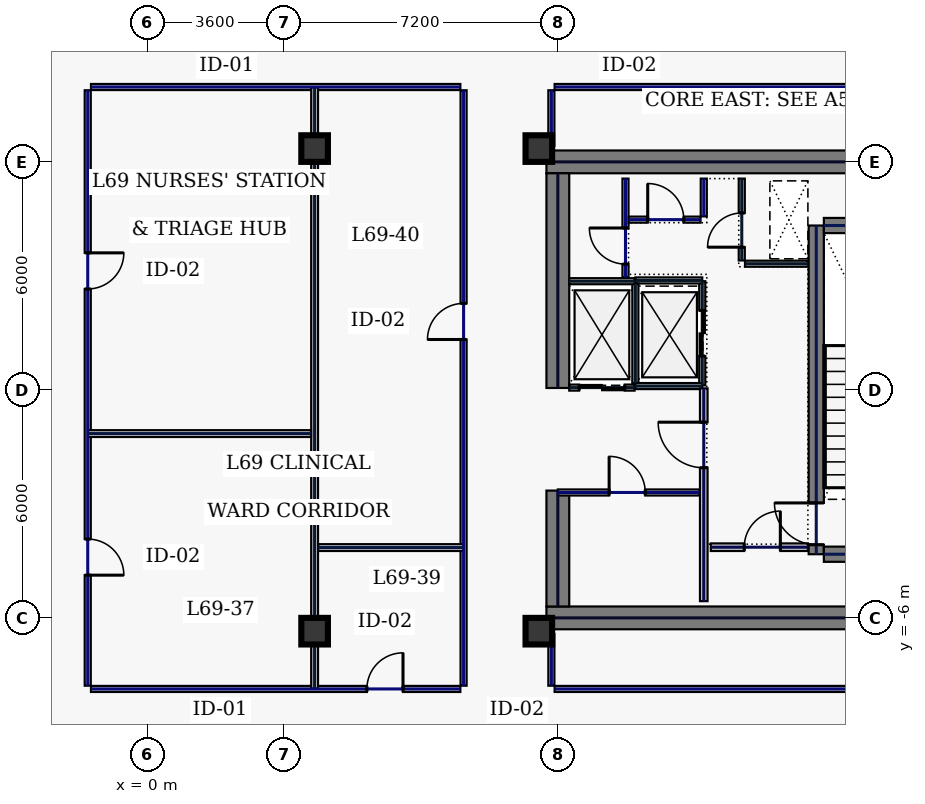
"""IFC4 building model, lengths in metres.
Left out: names, types, materials, properties, quantities, classifications, styles, units other than length and angle.
Written with IfcOpenShell. Run it as: python <this file> out.ifc"""

import sys

from ifc_helpers import new_model, si_unit, direction, frame, frame_2d, origin, origin_2d, place, context, subcontext, project, spatial, rectangle, hollow_rectangle, extrude, element, fill, save


model = new_model("IFC4")
c1 = context("Model", 3, precision=1e-05, world=origin(), true_north=direction((0.0, 1.0)))
c2 = subcontext(c1, "Body", "Model", "MODEL_VIEW")
j1 = project(units=[si_unit("LENGTHUNIT", "METRE"), si_unit("PLANEANGLEUNIT", "RADIAN")], contexts=[c1])
p1 = place(None, origin())
s1 = spatial("IfcSite", under=j1, at=p1, CompositionType="ELEMENT")
p2 = place(p1, origin())
s2 = spatial("IfcBuilding", under=s1, at=p2, CompositionType="ELEMENT")
p3 = place(p2, frame((0.0, 0.0, 297.0)))
s3 = spatial("IfcBuildingStorey", under=s2, at=p3, CompositionType="ELEMENT", Elevation=297.0)
for number, where, z_axis, x_axis in (
    (1, (10.5, 6.0, 0.0), (0.0, 0.0, 1.0), (1.0, 0.0, 0.0)),
    (2, (10.5, -6.0, 0.0), (0.0, 0.0, 1.0), (1.0, 0.0, 0.0)),
):
    element("IfcWall", number, at=place(p3, frame(where, z_axis=z_axis, x_axis=x_axis)), inside=s3, PredefinedType="SHEAR", context=c2, shape_type="SweptSolid", body=[
        extrude(rectangle(XDim=11.5, YDim=0.6, at=frame_2d((5.75, 0.0))), origin(), (0.0, 0.0, 1.0), 3.74),
    ])
p4 = place(p3, frame((10.8, -5.7, 0.0), z_axis=(0.0, 0.0, 1.0), x_axis=(0.0, 1.0, 0.0)))
e3 = element("IfcWall", 3, at=p4, inside=s3, PredefinedType="SHEAR", context=c2, shape_type="SweptSolid", body=[
    extrude(rectangle(XDim=3.05, YDim=0.6, at=frame_2d((1.525, 0.0))), origin(), (0.0, 0.0, 1.0), 3.74),
])
p5 = place(p3, frame((10.8, 0.05, 0.0), z_axis=(0.0, 0.0, 1.0), x_axis=(0.0, 1.0, 0.0)))
e4 = element("IfcWall", 4, at=p5, inside=s3, PredefinedType="SHEAR", context=c2, shape_type="SweptSolid", body=[
    extrude(rectangle(XDim=5.65, YDim=0.6, at=frame_2d((2.825, 0.0))), origin(), (0.0, 0.0, 1.0), 3.74),
])
p6 = place(p3, frame((17.6, -4.325, 0.0), z_axis=(0.0, 0.0, 1.0), x_axis=(0.0, 1.0, 0.0)))
e5 = element("IfcWall", 5, at=p6, inside=s3, PredefinedType="SHEAR", context=c2, shape_type="SweptSolid", body=[
    extrude(rectangle(XDim=8.65, YDim=0.4, at=frame_2d((4.325, 0.0))), origin(), (0.0, 0.0, 1.0), 3.74),
])
p7 = place(p6, frame((0.25, 0.0, 0.0)))
e6 = element("IfcOpeningElement", 6, at=p7, cuts=e5, PredefinedType="OPENING", context=c2, shape_type="SweptSolid", body=[
    extrude(rectangle(XDim=1.1, YDim=2.2, at=frame_2d((0.55, 1.1))), frame((0.0, 0.21, 0.0), z_axis=(0.0, -1.0, 0.0), x_axis=(1.0, 0.0, 0.0)), (0.0, 0.0, 1.0), 0.42),
])
for number, where, z_axis, x_axis in (
    (7, (17.8, -4.325, 0.0), (0.0, 0.0, 1.0), (1.0, 0.0, 0.0)),
    (8, (17.8, 4.325, 0.0), (0.0, 0.0, 1.0), (1.0, 0.0, 0.0)),
):
    element("IfcWall", number, at=place(p3, frame(where, z_axis=z_axis, x_axis=x_axis)), inside=s3, PredefinedType="SHEAR", context=c2, shape_type="SweptSolid", body=[
        extrude(rectangle(XDim=3.4, YDim=0.4, at=frame_2d((1.7, 0.0))), origin(), (0.0, 0.0, 1.0), 3.74),
    ])
for number, where, z_axis, x_axis in (
    (9, (10.3, -6.35, 0.0), (0.0, 0.0, 1.0), (1.0, 0.0, 0.0)),
    (10, (10.3, 6.35, 0.0), (0.0, 0.0, 1.0), (1.0, 0.0, 0.0)),
    (11, (4.4, -6.35, 0.0), (0.0, 0.0, 1.0), (1.0, 0.0, 0.0)),
    (12, (4.4, 6.35, 0.0), (0.0, 0.0, 1.0), (1.0, 0.0, 0.0)),
):
    element("IfcColumn", number, at=place(p3, frame(where, z_axis=z_axis, x_axis=x_axis)), inside=s3, PredefinedType="COLUMN", context=c2, shape_type="SweptSolid", body=[
        extrude(hollow_rectangle(XDim=0.7, YDim=0.7, WallThickness=0.032, at=origin_2d()), origin(), (0.0, 0.0, 1.0), 3.74),
    ])
p8 = place(p3, frame((14.6, 0.12, 0.0), z_axis=(0.0, 0.0, 1.0), x_axis=(0.0, 1.0, 0.0)))
e13 = element("IfcWall", 13, at=p8, inside=s3, PredefinedType="PARTITIONING", context=c2, shape_type="SweptSolid", body=[
    extrude(rectangle(XDim=2.74, YDim=0.16, at=frame_2d((1.37, 0.0))), origin(), (0.0, 0.0, 1.0), 3.74),
])
p9 = place(p8, frame((0.77, 0.0, 0.0)))
e14 = element("IfcOpeningElement", 14, at=p9, cuts=e13, PredefinedType="OPENING", context=c2, shape_type="SweptSolid", body=[
    extrude(rectangle(XDim=1.2, YDim=2.2, at=frame_2d((0.6, 1.1))), frame((0.0, 0.09, 0.0), z_axis=(0.0, -1.0, 0.0), x_axis=(1.0, 0.0, 0.0)), (0.0, 0.0, 1.0), 0.18),
])
for number, where, z_axis, x_axis in (
    (15, (12.84, 0.1, 0.0), (0.0, 0.0, 1.0), (1.0, 0.0, 0.0)),
    (16, (12.84, 2.88, 0.0), (0.0, 0.0, 1.0), (1.0, 0.0, 0.0)),
):
    element("IfcWall", number, at=place(p3, frame(where, z_axis=z_axis, x_axis=x_axis)), inside=s3, PredefinedType="PARTITIONING", context=c2, shape_type="SweptSolid", body=[
        extrude(rectangle(XDim=1.76, YDim=0.16, at=frame_2d((0.88, 0.0))), origin(), (0.0, 0.0, 1.0), 3.74),
    ])
p10 = place(p3, frame((12.84, 0.18, 0.0), z_axis=(0.0, 0.0, 1.0), x_axis=(0.0, 1.0, 0.0)))
e17 = element("IfcWall", 17, at=p10, inside=s3, PredefinedType="PARTITIONING", context=c2, shape_type="SweptSolid", body=[
    extrude(rectangle(XDim=2.62, YDim=0.16, at=frame_2d((1.31, 0.0))), origin(), (0.0, 0.0, 1.0), 3.74),
])
p11 = place(p3, frame((11.1, 0.06, 0.0), z_axis=(0.0, 0.0, 1.0), x_axis=(1.0, 0.0, 0.0)))
e18 = element("IfcWall", 18, at=p11, inside=s3, PredefinedType="PARTITIONING", context=c2, shape_type="SweptSolid", body=[
    extrude(rectangle(XDim=1.72, YDim=0.16, at=frame_2d((0.86, 0.0))), origin(), (0.0, 0.0, 1.0), 3.74),
])
p12 = place(p11, frame((0.26, 0.0, 0.0)))
e19 = element("IfcOpeningElement", 19, at=p12, cuts=e18, PredefinedType="OPENING", context=c2, shape_type="SweptSolid", body=[
    extrude(rectangle(XDim=1.2, YDim=2.2, at=frame_2d((0.6, 1.1))), frame((0.0, 0.09, 0.0), z_axis=(0.0, -1.0, 0.0), x_axis=(1.0, 0.0, 0.0)), (0.0, 0.0, 1.0), 0.18),
])
p13 = place(p3, frame((11.1, 2.86, 0.0), z_axis=(0.0, 0.0, 1.0), x_axis=(1.0, 0.0, 0.0)))
e20 = element("IfcWall", 20, at=p13, inside=s3, PredefinedType="PARTITIONING", context=c2, shape_type="SweptSolid", body=[
    extrude(rectangle(XDim=1.72, YDim=0.16, at=frame_2d((0.86, 0.0))), origin(), (0.0, 0.0, 1.0), 3.74),
])
p14 = place(p3, frame((15.64, 3.405, 0.0), z_axis=(0.0, 0.0, 1.0), x_axis=(0.0, 1.0, 0.0)))
e21 = element("IfcWall", 21, at=p14, inside=s3, PredefinedType="PARTITIONING", context=c2, shape_type="SweptSolid", body=[
    extrude(rectangle(XDim=2.155, YDim=0.16, at=frame_2d((1.078, 0.0))), origin(), (0.0, 0.0, 1.0), 3.74),
])
p15 = place(p14, frame((0.35, 0.0, 0.0)))
e22 = element("IfcOpeningElement", 22, at=p15, cuts=e21, PredefinedType="OPENING", context=c2, shape_type="SweptSolid", body=[
    extrude(rectangle(XDim=0.9, YDim=2.2, at=frame_2d((0.45, 1.1))), frame((0.0, 0.09, 0.0), z_axis=(0.0, -1.0, 0.0), x_axis=(1.0, 0.0, 0.0)), (0.0, 0.0, 1.0), 0.18),
])
p16 = place(p3, frame((15.725, 3.32, 0.0), z_axis=(0.0, 0.0, 1.0), x_axis=(1.0, 0.0, 0.0)))
e23 = element("IfcWall", 23, at=p16, inside=s3, PredefinedType="PARTITIONING", context=c2, shape_type="SweptSolid", body=[
    extrude(rectangle(XDim=1.655, YDim=0.16, at=frame_2d((0.827, 0.0))), origin(), (0.0, 0.0, 1.0), 3.74),
])
p17 = place(p3, frame((14.825, -4.14, 0.0), z_axis=(0.0, 0.0, 1.0), x_axis=(1.0, 0.0, 0.0)))
e24 = element("IfcWall", 24, at=p17, inside=s3, PredefinedType="SOLIDWALL", context=c2, shape_type="SweptSolid", body=[
    extrude(rectangle(XDim=2.555, YDim=0.2, at=frame_2d((1.277, 0.0))), origin(), (0.0, 0.0, 1.0), 3.74),
])
p18 = place(p17, frame((0.88, 0.0, 0.0)))
e25 = element("IfcOpeningElement", 25, at=p18, cuts=e24, PredefinedType="OPENING", context=c2, shape_type="SweptSolid", body=[
    extrude(rectangle(XDim=0.95, YDim=2.2, at=frame_2d((0.475, 1.1))), frame((0.0, 0.11, 0.0), z_axis=(0.0, -1.0, 0.0), x_axis=(1.0, 0.0, 0.0)), (0.0, 0.0, 1.0), 0.22),
])
p19 = place(p3, frame((10.8, -2.7, 0.0), z_axis=(0.0, 0.0, 1.0), x_axis=(1.0, 0.0, 0.0)))
e26 = element("IfcWall", 26, at=p19, inside=s3, PredefinedType="PARTITIONING", context=c2, shape_type="SweptSolid", body=[
    extrude(rectangle(XDim=3.735, YDim=0.16, at=frame_2d((1.867, 0.0))), origin(), (0.0, 0.0, 1.0), 3.74),
])
p20 = place(p19, frame((1.35, 0.0, 0.0)))
e27 = element("IfcOpeningElement", 27, at=p20, cuts=e26, PredefinedType="OPENING", context=c2, shape_type="SweptSolid", body=[
    extrude(rectangle(XDim=0.95, YDim=2.2, at=frame_2d((0.475, 1.1))), frame((0.0, 0.09, 0.0), z_axis=(0.0, -1.0, 0.0), x_axis=(1.0, 0.0, 0.0)), (0.0, 0.0, 1.0), 0.18),
])
p21 = place(p3, frame((12.58, 2.96, 0.0), z_axis=(0.0, 0.0, 1.0), x_axis=(0.0, 1.0, 0.0)))
e28 = element("IfcWall", 28, at=p21, inside=s3, PredefinedType="PARTITIONING", context=c2, shape_type="SweptSolid", body=[
    extrude(rectangle(XDim=2.6, YDim=0.16, at=frame_2d((1.3, 0.0))), origin(), (0.0, 0.0, 1.0), 3.74),
])
p22 = place(p21, frame((0.35, 0.0, 0.0)))
e29 = element("IfcOpeningElement", 29, at=p22, cuts=e28, PredefinedType="OPENING", context=c2, shape_type="SweptSolid", body=[
    extrude(rectangle(XDim=0.95, YDim=2.2, at=frame_2d((0.475, 1.1))), frame((0.0, 0.09, 0.0), z_axis=(0.0, -1.0, 0.0), x_axis=(1.0, 0.0, 0.0)), (0.0, 0.0, 1.0), 0.18),
])
p23 = place(p3, frame((12.665, 4.48, 0.0), z_axis=(0.0, 0.0, 1.0), x_axis=(1.0, 0.0, 0.0)))
e30 = element("IfcWall", 30, at=p23, inside=s3, PredefinedType="PARTITIONING", context=c2, shape_type="SweptSolid", body=[
    extrude(rectangle(XDim=1.89, YDim=0.16, at=frame_2d((0.945, 0.0))), origin(), (0.0, 0.0, 1.0), 3.74),
])
p24 = place(p23, frame((0.5, 0.0, 0.0)))
e31 = element("IfcOpeningElement", 31, at=p24, cuts=e30, PredefinedType="OPENING", context=c2, shape_type="SweptSolid", body=[
    extrude(rectangle(XDim=0.95, YDim=2.2, at=frame_2d((0.475, 1.1))), frame((0.0, 0.09, 0.0), z_axis=(0.0, -1.0, 0.0), x_axis=(1.0, 0.0, 0.0)), (0.0, 0.0, 1.0), 0.18),
])
p25 = place(p3, frame((14.64, 4.565, 0.0), z_axis=(0.0, 0.0, 1.0), x_axis=(0.0, 1.0, 0.0)))
e32 = element("IfcWall", 32, at=p25, inside=s3, PredefinedType="PARTITIONING", context=c2, shape_type="SweptSolid", body=[
    extrude(rectangle(XDim=0.995, YDim=0.16, at=frame_2d((0.498, 0.0))), origin(), (0.0, 0.0, 1.0), 3.74),
])
p26 = place(p3, frame((14.64, -5.56, 0.0), z_axis=(0.0, 0.0, 1.0), x_axis=(0.0, 1.0, 0.0)))
e33 = element("IfcWall", 33, at=p26, inside=s3, PredefinedType="SOLIDWALL", context=c2, shape_type="SweptSolid", body=[
    extrude(rectangle(XDim=5.6, YDim=0.2, at=frame_2d((2.8, 0.0))), origin(), (0.0, 0.0, 1.0), 3.74),
])
p27 = place(p26, frame((3.51, 0.0, 0.0)))
e34 = element("IfcOpeningElement", 34, at=p27, cuts=e33, PredefinedType="OPENING", context=c2, shape_type="SweptSolid", body=[
    extrude(rectangle(XDim=1.2, YDim=2.2, at=frame_2d((0.6, 1.1))), frame((0.0, 0.11, 0.0), z_axis=(0.0, -1.0, 0.0), x_axis=(1.0, 0.0, 0.0)), (0.0, 0.0, 1.0), 0.22),
])
p28 = place(p3, frame((21.915, 7.97, 0.0), z_axis=(0.0, 0.0, 1.0), x_axis=(-1.0, 0.0, 0.0)))
e35 = element("IfcWall", 35, at=p28, inside=s3, PredefinedType="PARTITIONING", context=c2, shape_type="SweptSolid", body=[
    extrude(rectangle(XDim=11.2, YDim=0.16, at=frame_2d((5.6, 0.0))), origin(), (0.0, 0.0, 1.0), 3.74),
])
p29 = place(p3, frame((10.63, 7.885, 0.0), z_axis=(0.0, 0.0, 1.0), x_axis=(0.0, -1.0, 0.0)))
e36 = element("IfcWall", 36, at=p29, inside=s3, PredefinedType="PARTITIONING", context=c2, shape_type="SweptSolid", body=[
    extrude(rectangle(XDim=1.465, YDim=0.16, at=frame_2d((0.732, 0.0))), origin(), (0.0, 0.0, 1.0), 3.74),
])
p30 = place(p3, frame((10.63, -6.42, 0.0), z_axis=(0.0, 0.0, 1.0), x_axis=(0.0, -1.0, 0.0)))
e37 = element("IfcWall", 37, at=p30, inside=s3, PredefinedType="PARTITIONING", context=c2, shape_type="SweptSolid", body=[
    extrude(rectangle(XDim=1.365, YDim=0.16, at=frame_2d((0.683, 0.0))), origin(), (0.0, 0.0, 1.0), 3.74),
])
p31 = place(p3, frame((10.715, -7.87, 0.0), z_axis=(0.0, 0.0, 1.0), x_axis=(1.0, 0.0, 0.0)))
e38 = element("IfcWall", 38, at=p31, inside=s3, PredefinedType="PARTITIONING", context=c2, shape_type="SweptSolid", body=[
    extrude(rectangle(XDim=11.2, YDim=0.16, at=frame_2d((5.6, 0.0))), origin(), (0.0, 0.0, 1.0), 3.74),
])
p32 = place(p3, frame((8.235, 7.97, 0.0), z_axis=(0.0, 0.0, 1.0), x_axis=(-1.0, 0.0, 0.0)))
e39 = element("IfcWall", 39, at=p32, inside=s3, PredefinedType="PARTITIONING", context=c2, shape_type="SweptSolid", body=[
    extrude(rectangle(XDim=9.72, YDim=0.16, at=frame_2d((4.86, 0.0))), origin(), (0.0, 0.0, 1.0), 3.74),
])
p33 = place(p3, frame((-1.57, 7.885, 0.0), z_axis=(0.0, 0.0, 1.0), x_axis=(0.0, -1.0, 0.0)))
e40 = element("IfcWall", 40, at=p33, inside=s3, PredefinedType="PARTITIONING", context=c2, shape_type="SweptSolid", body=[
    extrude(rectangle(XDim=15.67, YDim=0.16, at=frame_2d((7.835, 0.0))), origin(), (0.0, 0.0, 1.0), 3.74),
])
p34 = place(p33, frame((11.811, 0.0, 0.0)))
e41 = element("IfcOpeningElement", 41, at=p34, cuts=e40, PredefinedType="OPENING", context=c2, shape_type="SweptSolid", body=[
    extrude(rectangle(XDim=0.95, YDim=2.2, at=frame_2d((0.475, 1.1))), frame((0.0, 0.09, 0.0), z_axis=(0.0, -1.0, 0.0), x_axis=(1.0, 0.0, 0.0)), (0.0, 0.0, 1.0), 0.18),
])
p35 = place(p33, frame((4.279, 0.0, 0.0)))
e42 = element("IfcOpeningElement", 42, at=p35, cuts=e40, PredefinedType="OPENING", context=c2, shape_type="SweptSolid", body=[
    extrude(rectangle(XDim=0.95, YDim=2.2, at=frame_2d((0.475, 1.1))), frame((0.0, 0.09, 0.0), z_axis=(0.0, -1.0, 0.0), x_axis=(1.0, 0.0, 0.0)), (0.0, 0.0, 1.0), 0.18),
])
p36 = place(p3, frame((-1.485, -7.87, 0.0), z_axis=(0.0, 0.0, 1.0), x_axis=(1.0, 0.0, 0.0)))
e43 = element("IfcWall", 43, at=p36, inside=s3, PredefinedType="PARTITIONING", context=c2, shape_type="SweptSolid", body=[
    extrude(rectangle(XDim=9.72, YDim=0.16, at=frame_2d((4.86, 0.0))), origin(), (0.0, 0.0, 1.0), 3.74),
])
p37 = place(p36, frame((7.261, 0.0, 0.0)))
e44 = element("IfcOpeningElement", 44, at=p37, cuts=e43, PredefinedType="OPENING", context=c2, shape_type="SweptSolid", body=[
    extrude(rectangle(XDim=0.95, YDim=2.2, at=frame_2d((0.475, 1.1))), frame((0.0, 0.09, 0.0), z_axis=(0.0, -1.0, 0.0), x_axis=(1.0, 0.0, 0.0)), (0.0, 0.0, 1.0), 0.18),
])
p38 = place(p3, frame((8.32, -7.785, 0.0), z_axis=(0.0, 0.0, 1.0), x_axis=(0.0, 1.0, 0.0)))
e45 = element("IfcWall", 45, at=p38, inside=s3, PredefinedType="PARTITIONING", context=c2, shape_type="SweptSolid", body=[
    extrude(rectangle(XDim=15.67, YDim=0.16, at=frame_2d((7.835, 0.0))), origin(), (0.0, 0.0, 1.0), 3.74),
])
p39 = place(p38, frame((9.111, 0.0, 0.0)))
e46 = element("IfcOpeningElement", 46, at=p39, cuts=e45, PredefinedType="OPENING", context=c2, shape_type="SweptSolid", body=[
    extrude(rectangle(XDim=0.95, YDim=2.2, at=frame_2d((0.475, 1.1))), frame((0.0, 0.09, 0.0), z_axis=(0.0, -1.0, 0.0), x_axis=(1.0, 0.0, 0.0)), (0.0, 0.0, 1.0), 0.18),
])
p40 = place(p3, frame((4.4, -7.865, 0.0), z_axis=(0.0, 0.0, 1.0), x_axis=(0.0, 1.0, 0.0)))
e47 = element("IfcWall", 47, at=p40, inside=s3, PredefinedType="PARTITIONING", context=c2, shape_type="SweptSolid", body=[
    extrude(rectangle(XDim=15.83, YDim=0.18, at=frame_2d((7.915, 0.0))), origin(), (0.0, 0.0, 1.0), 3.035),
])
p41 = place(p3, frame((-1.565, -1.15, 0.0), z_axis=(0.0, 0.0, 1.0), x_axis=(1.0, 0.0, 0.0)))
e48 = element("IfcWall", 48, at=p41, inside=s3, PredefinedType="PARTITIONING", context=c2, shape_type="SweptSolid", body=[
    extrude(rectangle(XDim=5.87, YDim=0.18, at=frame_2d((2.935, 0.0))), origin(), (0.0, 0.0, 1.0), 3.74),
])
p42 = place(p3, frame((4.495, -4.15, 0.0), z_axis=(0.0, 0.0, 1.0), x_axis=(1.0, 0.0, 0.0)))
e49 = element("IfcWall", 49, at=p42, inside=s3, PredefinedType="PARTITIONING", context=c2, shape_type="SweptSolid", body=[
    extrude(rectangle(XDim=3.82, YDim=0.18, at=frame_2d((1.91, 0.0))), origin(), (0.0, 0.0, 1.0), 3.74),
])
p43 = place(p7, origin())
e50 = element("IfcDoor", 50, at=p43, inside=s3, OperationType="SINGLE_SWING_RIGHT", PredefinedType="DOOR", context=c2, shape_type="SweptSolid", body=[
    extrude(rectangle(XDim=1.1, YDim=2.2, at=frame_2d((0.55, 1.1))), frame((0.0, 0.025, 0.0), z_axis=(0.0, -1.0, 0.0), x_axis=(1.0, 0.0, 0.0)), (0.0, 0.0, 1.0), 0.05),
])
fill(e6, e50)
p44 = place(p9, origin())
e51 = element("IfcDoor", 51, at=p44, inside=s3, OperationType="SLIDING_TO_LEFT", PredefinedType="DOOR", context=c2, shape_type="SweptSolid", body=[
    extrude(rectangle(XDim=1.2, YDim=2.2, at=frame_2d((0.6, 1.1))), frame((0.0, 0.025, 0.0), z_axis=(0.0, -1.0, 0.0), x_axis=(1.0, 0.0, 0.0)), (0.0, 0.0, 1.0), 0.05),
])
fill(e14, e51)
p45 = place(p12, origin())
e52 = element("IfcDoor", 52, at=p45, inside=s3, OperationType="SLIDING_TO_LEFT", PredefinedType="DOOR", context=c2, shape_type="SweptSolid", body=[
    extrude(rectangle(XDim=1.2, YDim=2.2, at=frame_2d((0.6, 1.1))), frame((0.0, 0.025, 0.0), z_axis=(0.0, -1.0, 0.0), x_axis=(1.0, 0.0, 0.0)), (0.0, 0.0, 1.0), 0.05),
])
fill(e19, e52)
p46 = place(p15, origin())
e53 = element("IfcDoor", 53, at=p46, inside=s3, OperationType="SINGLE_SWING_LEFT", PredefinedType="DOOR", context=c2, shape_type="SweptSolid", body=[
    extrude(rectangle(XDim=0.9, YDim=2.2, at=frame_2d((0.45, 1.1))), frame((0.0, 0.025, 0.0), z_axis=(0.0, -1.0, 0.0), x_axis=(1.0, 0.0, 0.0)), (0.0, 0.0, 1.0), 0.05),
])
fill(e22, e53)
p47 = place(p18, origin())
e54 = element("IfcDoor", 54, at=p47, inside=s3, OperationType="SINGLE_SWING_RIGHT", PredefinedType="DOOR", context=c2, shape_type="SweptSolid", body=[
    extrude(rectangle(XDim=0.95, YDim=2.2, at=frame_2d((0.475, 1.1))), frame((0.0, 0.025, 0.0), z_axis=(0.0, -1.0, 0.0), x_axis=(1.0, 0.0, 0.0)), (0.0, 0.0, 1.0), 0.05),
])
fill(e25, e54)
p48 = place(p20, origin())
e55 = element("IfcDoor", 55, at=p48, inside=s3, OperationType="SINGLE_SWING_LEFT", PredefinedType="DOOR", context=c2, shape_type="SweptSolid", body=[
    extrude(rectangle(XDim=0.95, YDim=2.2, at=frame_2d((0.475, 1.1))), frame((0.0, 0.025, 0.0), z_axis=(0.0, -1.0, 0.0), x_axis=(1.0, 0.0, 0.0)), (0.0, 0.0, 1.0), 0.05),
])
fill(e27, e55)
p49 = place(p22, origin())
e56 = element("IfcDoor", 56, at=p49, inside=s3, OperationType="SINGLE_SWING_RIGHT", PredefinedType="DOOR", context=c2, shape_type="SweptSolid", body=[
    extrude(rectangle(XDim=0.95, YDim=2.2, at=frame_2d((0.475, 1.1))), frame((0.0, 0.025, 0.0), z_axis=(0.0, -1.0, 0.0), x_axis=(1.0, 0.0, 0.0)), (0.0, 0.0, 1.0), 0.05),
])
fill(e29, e56)
p50 = place(p24, origin())
e57 = element("IfcDoor", 57, at=p50, inside=s3, OperationType="SINGLE_SWING_LEFT", PredefinedType="DOOR", context=c2, shape_type="SweptSolid", body=[
    extrude(rectangle(XDim=0.95, YDim=2.2, at=frame_2d((0.475, 1.1))), frame((0.0, 0.025, 0.0), z_axis=(0.0, -1.0, 0.0), x_axis=(1.0, 0.0, 0.0)), (0.0, 0.0, 1.0), 0.05),
])
fill(e31, e57)
p51 = place(p27, origin())
e58 = element("IfcDoor", 58, at=p51, inside=s3, OperationType="SINGLE_SWING_RIGHT", PredefinedType="DOOR", context=c2, shape_type="SweptSolid", body=[
    extrude(rectangle(XDim=1.2, YDim=2.2, at=frame_2d((0.6, 1.1))), frame((0.0, 0.025, 0.0), z_axis=(0.0, -1.0, 0.0), x_axis=(1.0, 0.0, 0.0)), (0.0, 0.0, 1.0), 0.05),
])
fill(e34, e58)
p52 = place(p34, origin())
e59 = element("IfcDoor", 59, at=p52, inside=s3, OperationType="SINGLE_SWING_RIGHT", PredefinedType="DOOR", context=c2, shape_type="SweptSolid", body=[
    extrude(rectangle(XDim=0.95, YDim=2.2, at=frame_2d((0.475, 1.1))), frame((0.0, 0.025, 0.0), z_axis=(0.0, -1.0, 0.0), x_axis=(1.0, 0.0, 0.0)), (0.0, 0.0, 1.0), 0.05),
])
fill(e41, e59)
p53 = place(p35, origin())
e60 = element("IfcDoor", 60, at=p53, inside=s3, OperationType="SINGLE_SWING_LEFT", PredefinedType="DOOR", context=c2, shape_type="SweptSolid", body=[
    extrude(rectangle(XDim=0.95, YDim=2.2, at=frame_2d((0.475, 1.1))), frame((0.0, 0.025, 0.0), z_axis=(0.0, -1.0, 0.0), x_axis=(1.0, 0.0, 0.0)), (0.0, 0.0, 1.0), 0.05),
])
fill(e42, e60)
p54 = place(p37, origin())
e61 = element("IfcDoor", 61, at=p54, inside=s3, OperationType="SINGLE_SWING_RIGHT", PredefinedType="DOOR", context=c2, shape_type="SweptSolid", body=[
    extrude(rectangle(XDim=0.95, YDim=2.2, at=frame_2d((0.475, 1.1))), frame((0.0, 0.025, 0.0), z_axis=(0.0, -1.0, 0.0), x_axis=(1.0, 0.0, 0.0)), (0.0, 0.0, 1.0), 0.05),
])
fill(e44, e61)
p55 = place(p39, origin())
e62 = element("IfcDoor", 62, at=p55, inside=s3, OperationType="SINGLE_SWING_LEFT", PredefinedType="DOOR", context=c2, shape_type="SweptSolid", body=[
    extrude(rectangle(XDim=0.95, YDim=2.2, at=frame_2d((0.475, 1.1))), frame((0.0, 0.025, 0.0), z_axis=(0.0, -1.0, 0.0), x_axis=(1.0, 0.0, 0.0)), (0.0, 0.0, 1.0), 0.05),
])
fill(e46, e62)
save(model, sys.argv[1])
